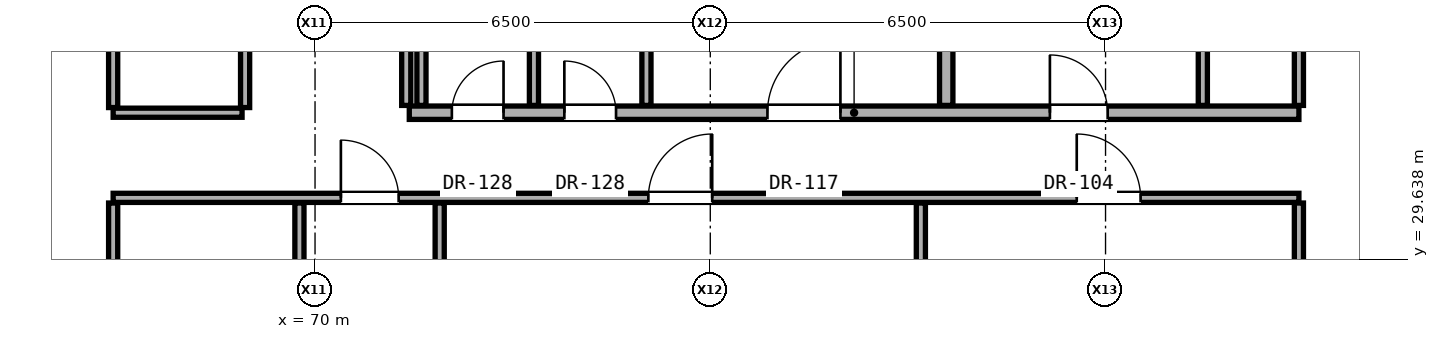
"""IFC4 building model, lengths in metres.
Left out: names, types, materials, properties, quantities, classifications, styles, units other than length and angle.
Written with IfcOpenShell. Run it as: python <this file> out.ifc"""

import sys

from ifc_helpers import new_model, si_unit, direction, frame, frame_2d, origin, place, context, subcontext, project, spatial, rectangle, extrude, element, fill, save


model = new_model("IFC4")
c1 = context("Model", 3, precision=1e-05, world=origin(), true_north=direction((0.0, 1.0)))
c2 = subcontext(c1, "Body", "Model", "MODEL_VIEW")
j1 = project(units=[si_unit("LENGTHUNIT", "METRE"), si_unit("PLANEANGLEUNIT", "RADIAN")], contexts=[c1])
p1 = place(None, origin())
s1 = spatial("IfcSite", under=j1, at=p1, CompositionType="ELEMENT")
p2 = place(p1, origin())
s2 = spatial("IfcBuilding", under=s1, at=p2, CompositionType="ELEMENT")
p3 = place(p2, frame((0.0, 0.0, 144.5)))
s3 = spatial("IfcBuildingStorey", under=s2, at=p3, CompositionType="ELEMENT", Elevation=144.5)
p4 = place(p3, frame((66.68, 30.65, 0.0), z_axis=(0.0, 0.0, 1.0), x_axis=(1.0, 0.0, 0.0)))
e1 = element("IfcWall", 1, at=p4, inside=s3, PredefinedType="PARTITIONING", context=c2, shape_type="SweptSolid", body=[
    extrude(rectangle(XDim=19.5, YDim=0.15, at=frame_2d((9.75, 0.0))), origin(), (0.0, 0.0, 1.0), 2.316),
])
p5 = place(p4, frame((3.745, 0.0, 0.0)))
e2 = element("IfcOpeningElement", 2, at=p5, cuts=e1, PredefinedType="OPENING", context=c2, shape_type="SweptSolid", body=[
    extrude(rectangle(XDim=0.95, YDim=2.15, at=frame_2d((0.475, 1.075))), frame((0.0, 0.085, 0.0), z_axis=(0.0, -1.0, 0.0), x_axis=(1.0, 0.0, 0.0)), (0.0, 0.0, 1.0), 0.17),
])
p6 = place(p4, frame((8.802, 0.0, 0.0)))
e3 = element("IfcOpeningElement", 3, at=p6, cuts=e1, PredefinedType="OPENING", context=c2, shape_type="SweptSolid", body=[
    extrude(rectangle(XDim=1.05, YDim=2.2, at=frame_2d((0.525, 1.1))), frame((0.0, 0.085, 0.0), z_axis=(0.0, -1.0, 0.0), x_axis=(1.0, 0.0, 0.0)), (0.0, 0.0, 1.0), 0.17),
])
p7 = place(p4, frame((15.846, 0.0, 0.0)))
e4 = element("IfcOpeningElement", 4, at=p7, cuts=e1, PredefinedType="OPENING", context=c2, shape_type="SweptSolid", body=[
    extrude(rectangle(XDim=1.05, YDim=2.2, at=frame_2d((0.525, 1.1))), frame((0.0, 0.085, 0.0), z_axis=(0.0, -1.0, 0.0), x_axis=(1.0, 0.0, 0.0)), (0.0, 0.0, 1.0), 0.17),
])
p8 = place(p3, frame((66.68, 32.05, 0.0), z_axis=(0.0, 0.0, 1.0), x_axis=(1.0, 0.0, 0.0)))
e5 = element("IfcWall", 5, at=p8, inside=s3, PredefinedType="PARTITIONING", context=c2, shape_type="SweptSolid", body=[
    extrude(rectangle(XDim=2.12, YDim=0.15, at=frame_2d((1.06, 0.0))), origin(), (0.0, 0.0, 1.0), 2.316),
])
p9 = place(p3, frame((71.55, 32.05, 0.0), z_axis=(0.0, 0.0, 1.0), x_axis=(1.0, 0.0, 0.0)))
e6 = element("IfcWall", 6, at=p9, inside=s3, PredefinedType="SOLIDWALL", context=c2, shape_type="SweptSolid", body=[
    extrude(rectangle(XDim=14.63, YDim=0.22, at=frame_2d((7.315, 0.0))), origin(), (0.0, 0.0, 1.0), 2.316),
])
p10 = place(p9, frame((5.89, 0.0, 0.0)))
e7 = element("IfcOpeningElement", 7, at=p10, cuts=e6, PredefinedType="OPENING", context=c2, shape_type="SweptSolid", body=[
    extrude(rectangle(XDim=1.2, YDim=2.25, at=frame_2d((0.6, 1.125))), frame((0.0, 0.12, 0.0), z_axis=(0.0, -1.0, 0.0), x_axis=(1.0, 0.0, 0.0)), (0.0, 0.0, 1.0), 0.24),
])
p11 = place(p9, frame((10.535, 0.0, 0.0)))
e8 = element("IfcOpeningElement", 8, at=p11, cuts=e6, PredefinedType="OPENING", context=c2, shape_type="SweptSolid", body=[
    extrude(rectangle(XDim=0.95, YDim=2.15, at=frame_2d((0.475, 1.075))), frame((0.0, 0.12, 0.0), z_axis=(0.0, -1.0, 0.0), x_axis=(1.0, 0.0, 0.0)), (0.0, 0.0, 1.0), 0.24),
])
p12 = place(p9, frame((0.7, 0.0, 0.0)))
e9 = element("IfcOpeningElement", 9, at=p12, cuts=e6, PredefinedType="OPENING", context=c2, shape_type="SweptSolid", body=[
    extrude(rectangle(XDim=0.85, YDim=2.01, at=frame_2d((0.425, 1.005))), frame((0.0, 0.12, 0.0), z_axis=(0.0, -1.0, 0.0), x_axis=(1.0, 0.0, 0.0)), (0.0, 0.0, 1.0), 0.24),
])
p13 = place(p9, frame((2.55, 0.0, 0.0)))
e10 = element("IfcOpeningElement", 10, at=p13, cuts=e6, PredefinedType="OPENING", context=c2, shape_type="SweptSolid", body=[
    extrude(rectangle(XDim=0.85, YDim=2.01, at=frame_2d((0.425, 1.005))), frame((0.0, 0.12, 0.0), z_axis=(0.0, -1.0, 0.0), x_axis=(1.0, 0.0, 0.0)), (0.0, 0.0, 1.0), 0.24),
])
p14 = place(p3, frame((66.68, 24.935, 0.0), z_axis=(0.0, 0.0, 1.0), x_axis=(0.0, 1.0, 0.0)))
e11 = element("IfcWall", 11, at=p14, inside=s3, PredefinedType="PARTITIONING", context=c2, shape_type="SweptSolid", body=[
    extrude(rectangle(XDim=5.63, YDim=0.15, at=frame_2d((2.815, 0.0))), origin(), (0.0, 0.0, 1.0), 2.316),
])
p15 = place(p14, frame((2.34, 0.0, 0.0)))
e12 = element("IfcOpeningElement", 12, at=p15, cuts=e11, PredefinedType="OPENING", context=c2, shape_type="SweptSolid", body=[
    extrude(rectangle(XDim=0.95, YDim=2.15, at=frame_2d((0.475, 1.075))), frame((0.0, 0.085, 0.0), z_axis=(0.0, -1.0, 0.0), x_axis=(1.0, 0.0, 0.0)), (0.0, 0.0, 1.0), 0.17),
])
p16 = place(p3, frame((66.68, 32.135, 0.0), z_axis=(0.0, 0.0, 1.0), x_axis=(0.0, 1.0, 0.0)))
e13 = element("IfcWall", 13, at=p16, inside=s3, PredefinedType="PARTITIONING", context=c2, shape_type="SweptSolid", body=[
    extrude(rectangle(XDim=3.48, YDim=0.15, at=frame_2d((1.74, 0.0))), origin(), (0.0, 0.0, 1.0), 2.332),
])
p17 = place(p3, frame((68.85, 32.135, 0.0), z_axis=(0.0, 0.0, 1.0), x_axis=(0.0, 1.0, 0.0)))
e14 = element("IfcWall", 14, at=p17, inside=s3, PredefinedType="PARTITIONING", context=c2, shape_type="SweptSolid", body=[
    extrude(rectangle(XDim=2.795, YDim=0.15, at=frame_2d((1.397, 0.0))), origin(), (0.0, 0.0, 1.0), 2.94),
])
p18 = place(p3, frame((69.743, 24.935, 0.0), z_axis=(0.0, 0.0, 1.0), x_axis=(0.0, 1.0, 0.0)))
e15 = element("IfcWall", 15, at=p18, inside=s3, PredefinedType="PARTITIONING", context=c2, shape_type="SweptSolid", body=[
    extrude(rectangle(XDim=5.63, YDim=0.15, at=frame_2d((2.815, 0.0))), origin(), (0.0, 0.0, 1.0), 2.316),
])
for number, where, z_axis, x_axis in (
    (16, (71.5, 32.17, 0.0), (0.0, 0.0, 1.0), (0.0, 1.0, 0.0)),
    (17, (71.75, 32.17, 0.0), (0.0, 0.0, 1.0), (0.0, 1.0, 0.0)),
):
    element("IfcWall", number, at=place(p3, frame(where, z_axis=z_axis, x_axis=x_axis)), inside=s3, PredefinedType="PARTITIONING", context=c2, shape_type="SweptSolid", body=[
        extrude(rectangle(XDim=2.76, YDim=0.15, at=frame_2d((1.38, 0.0))), origin(), (0.0, 0.0, 1.0), 2.94),
    ])
p19 = place(p3, frame((72.05, 26.17, 0.0), z_axis=(0.0, 0.0, 1.0), x_axis=(0.0, 1.0, 0.0)))
e18 = element("IfcWall", 18, at=p19, inside=s3, PredefinedType="PARTITIONING", context=c2, shape_type="SweptSolid", body=[
    extrude(rectangle(XDim=4.395, YDim=0.15, at=frame_2d((2.198, 0.0))), origin(), (0.0, 0.0, 1.0), 2.316),
])
for number, where, z_axis, x_axis in (
    (19, (73.6, 32.17, 0.0), (0.0, 0.0, 1.0), (0.0, 1.0, 0.0)),
    (20, (75.45, 32.17, 0.0), (0.0, 0.0, 1.0), (0.0, 1.0, 0.0)),
):
    element("IfcWall", number, at=place(p3, frame(where, z_axis=z_axis, x_axis=x_axis)), inside=s3, PredefinedType="PARTITIONING", context=c2, shape_type="SweptSolid", body=[
        extrude(rectangle(XDim=2.76, YDim=0.15, at=frame_2d((1.38, 0.0))), origin(), (0.0, 0.0, 1.0), 2.94),
    ])
p20 = place(p3, frame((79.963, 26.17, 0.0), z_axis=(0.0, 0.0, 1.0), x_axis=(0.0, 1.0, 0.0)))
e21 = element("IfcWall", 21, at=p20, inside=s3, PredefinedType="PARTITIONING", context=c2, shape_type="SweptSolid", body=[
    extrude(rectangle(XDim=4.395, YDim=0.15, at=frame_2d((2.198, 0.0))), origin(), (0.0, 0.0, 1.0), 2.316),
])
p21 = place(p3, frame((80.38, 32.17, 0.0), z_axis=(0.0, 0.0, 1.0), x_axis=(0.0, 1.0, 0.0)))
e22 = element("IfcWall", 22, at=p21, inside=s3, PredefinedType="SOLIDWALL", context=c2, shape_type="SweptSolid", body=[
    extrude(rectangle(XDim=2.76, YDim=0.22, at=frame_2d((1.38, 0.0))), origin(), (0.0, 0.0, 1.0), 2.94),
])
p22 = place(p3, frame((84.6, 32.17, 0.0), z_axis=(0.0, 0.0, 1.0), x_axis=(0.0, 1.0, 0.0)))
e23 = element("IfcWall", 23, at=p22, inside=s3, PredefinedType="PARTITIONING", context=c2, shape_type="SweptSolid", body=[
    extrude(rectangle(XDim=2.76, YDim=0.15, at=frame_2d((1.38, 0.0))), origin(), (0.0, 0.0, 1.0), 2.94),
])
p23 = place(p3, frame((86.18, 26.17, 0.0), z_axis=(0.0, 0.0, 1.0), x_axis=(0.0, 1.0, 0.0)))
e24 = element("IfcWall", 24, at=p23, inside=s3, PredefinedType="PARTITIONING", context=c2, shape_type="SweptSolid", body=[
    extrude(rectangle(XDim=4.395, YDim=0.15, at=frame_2d((2.198, 0.0))), origin(), (0.0, 0.0, 1.0), 2.316),
])
p24 = place(p3, frame((86.18, 32.17, 0.0), z_axis=(0.0, 0.0, 1.0), x_axis=(0.0, 1.0, 0.0)))
e25 = element("IfcWall", 25, at=p24, inside=s3, PredefinedType="PARTITIONING", context=c2, shape_type="SweptSolid", body=[
    extrude(rectangle(XDim=3.445, YDim=0.15, at=frame_2d((1.723, 0.0))), origin(), (0.0, 0.0, 1.0), 2.332),
])
p25 = place(p10, origin())
e26 = element("IfcDoor", 26, at=p25, inside=s3, OperationType="SINGLE_SWING_RIGHT", PredefinedType="DOOR", context=c2, shape_type="SweptSolid", body=[
    extrude(rectangle(XDim=1.2, YDim=2.25, at=frame_2d((0.6, 1.125))), frame((0.0, 0.025, 0.0), z_axis=(0.0, -1.0, 0.0), x_axis=(1.0, 0.0, 0.0)), (0.0, 0.0, 1.0), 0.05),
])
fill(e7, e26)
p26 = place(p11, origin())
e27 = element("IfcDoor", 27, at=p26, inside=s3, OperationType="SINGLE_SWING_LEFT", PredefinedType="DOOR", context=c2, shape_type="SweptSolid", body=[
    extrude(rectangle(XDim=0.95, YDim=2.15, at=frame_2d((0.475, 1.075))), frame((0.0, 0.025, 0.0), z_axis=(0.0, -1.0, 0.0), x_axis=(1.0, 0.0, 0.0)), (0.0, 0.0, 1.0), 0.05),
])
fill(e8, e27)
p27 = place(p12, origin())
e28 = element("IfcDoor", 28, at=p27, inside=s3, OperationType="SINGLE_SWING_RIGHT", PredefinedType="DOOR", context=c2, shape_type="SweptSolid", body=[
    extrude(rectangle(XDim=0.85, YDim=2.01, at=frame_2d((0.425, 1.005))), frame((0.0, 0.025, 0.0), z_axis=(0.0, -1.0, 0.0), x_axis=(1.0, 0.0, 0.0)), (0.0, 0.0, 1.0), 0.05),
])
fill(e9, e28)
p28 = place(p13, origin())
e29 = element("IfcDoor", 29, at=p28, inside=s3, OperationType="SINGLE_SWING_LEFT", PredefinedType="DOOR", context=c2, shape_type="SweptSolid", body=[
    extrude(rectangle(XDim=0.85, YDim=2.01, at=frame_2d((0.425, 1.005))), frame((0.0, 0.025, 0.0), z_axis=(0.0, -1.0, 0.0), x_axis=(1.0, 0.0, 0.0)), (0.0, 0.0, 1.0), 0.05),
])
fill(e10, e29)
p29 = place(p5, origin())
e30 = element("IfcDoor", 30, at=p29, inside=s3, OperationType="SINGLE_SWING_LEFT", PredefinedType="DOOR", context=c2, shape_type="SweptSolid", body=[
    extrude(rectangle(XDim=0.95, YDim=2.15, at=frame_2d((0.475, 1.075))), frame((0.0, 0.025, 0.0), z_axis=(0.0, -1.0, 0.0), x_axis=(1.0, 0.0, 0.0)), (0.0, 0.0, 1.0), 0.05),
])
fill(e2, e30)
p30 = place(p6, origin())
e31 = element("IfcDoor", 31, at=p30, inside=s3, OperationType="SINGLE_SWING_RIGHT", PredefinedType="DOOR", context=c2, shape_type="SweptSolid", body=[
    extrude(rectangle(XDim=1.05, YDim=2.2, at=frame_2d((0.525, 1.1))), frame((0.0, 0.025, 0.0), z_axis=(0.0, -1.0, 0.0), x_axis=(1.0, 0.0, 0.0)), (0.0, 0.0, 1.0), 0.05),
])
fill(e3, e31)
p31 = place(p7, origin())
e32 = element("IfcDoor", 32, at=p31, inside=s3, OperationType="SINGLE_SWING_LEFT", PredefinedType="DOOR", context=c2, shape_type="SweptSolid", body=[
    extrude(rectangle(XDim=1.05, YDim=2.2, at=frame_2d((0.525, 1.1))), frame((0.0, 0.025, 0.0), z_axis=(0.0, -1.0, 0.0), x_axis=(1.0, 0.0, 0.0)), (0.0, 0.0, 1.0), 0.05),
])
fill(e4, e32)
save(model, sys.argv[1])
